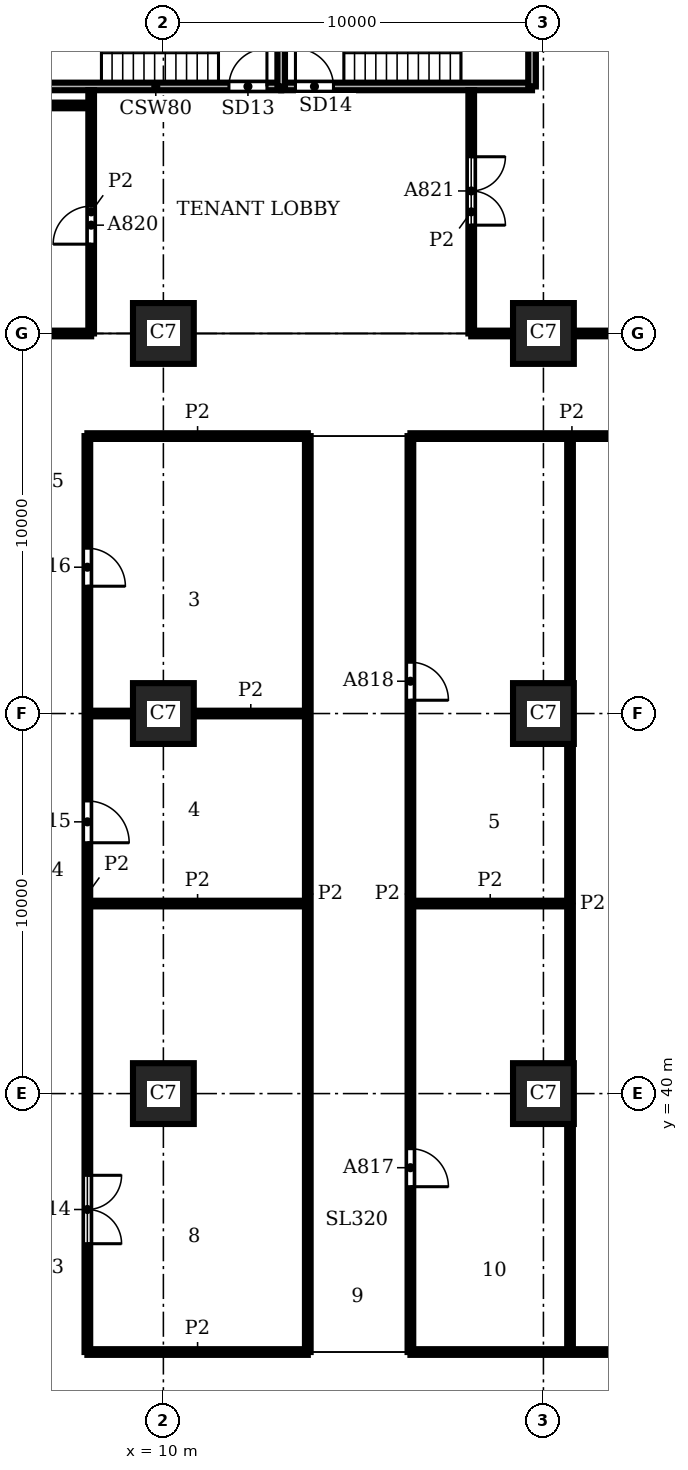
"""IFC4 building model, lengths in metres.
Left out: names, types, materials, properties, quantities, classifications, styles, units other than length and angle.
Written with IfcOpenShell. Run it as: python <this file> out.ifc"""

import sys

from ifc_helpers import new_model, si_unit, direction, frame, frame_2d, origin, origin_2d, place, context, subcontext, project, spatial, rectangle, extrude, element, fill, save


model = new_model("IFC4")
c1 = context("Model", 3, precision=1e-05, world=origin(), true_north=direction((0.0, 1.0)))
c2 = subcontext(c1, "Body", "Model", "MODEL_VIEW")
j1 = project(units=[si_unit("LENGTHUNIT", "METRE"), si_unit("PLANEANGLEUNIT", "RADIAN")], contexts=[c1])
p1 = place(None, origin())
s1 = spatial("IfcSite", under=j1, at=p1, CompositionType="ELEMENT")
p2 = place(p1, origin())
s2 = spatial("IfcBuilding", under=s1, at=p2, CompositionType="ELEMENT")
p3 = place(p2, frame((0.0, 0.0, 93.9)))
s3 = spatial("IfcBuildingStorey", under=s2, at=p3, CompositionType="ELEMENT", Elevation=93.9)
for number, where, z_axis, x_axis in (
    (1, (10.0, 40.0, 0.0), (0.0, 0.0, 1.0), (1.0, 0.0, 0.0)),
    (2, (10.0, 50.0, 0.0), (0.0, 0.0, 1.0), (1.0, 0.0, 0.0)),
    (3, (10.0, 60.0, 0.0), (0.0, 0.0, 1.0), (1.0, 0.0, 0.0)),
    (4, (20.0, 40.0, 0.0), (0.0, 0.0, 1.0), (1.0, 0.0, 0.0)),
    (5, (20.0, 50.0, 0.0), (0.0, 0.0, 1.0), (1.0, 0.0, 0.0)),
    (6, (20.0, 60.0, 0.0), (0.0, 0.0, 1.0), (1.0, 0.0, 0.0)),
):
    element("IfcColumn", number, at=place(p3, frame(where, z_axis=z_axis, x_axis=x_axis)), inside=s3, PredefinedType="COLUMN", context=c2, shape_type="SweptSolid", body=[
        extrude(rectangle(XDim=1.6, YDim=1.6, at=origin_2d()), origin(), (0.0, 0.0, 1.0), 3.9),
    ])
p4 = place(p3, frame((6.5, 66.5, 0.0), z_axis=(0.0, 0.0, 1.0), x_axis=(1.0, 0.0, 0.0)))
e7 = element("IfcWall", 7, at=p4, inside=s3, PredefinedType="SHEAR", context=c2, shape_type="SweptSolid", body=[
    extrude(rectangle(XDim=6.6, YDim=0.2, at=frame_2d((3.3, 0.0))), origin(), (0.0, 0.0, 1.0), 3.58),
])
p5 = place(p4, frame((5.225, 0.0, 0.0)))
e8 = element("IfcOpeningElement", 8, at=p5, cuts=e7, PredefinedType="OPENING", context=c2, shape_type="SweptSolid", body=[
    extrude(rectangle(XDim=1.0, YDim=2.1, at=frame_2d((0.5, 1.05))), frame((0.0, 0.11, 0.0), z_axis=(0.0, -1.0, 0.0), x_axis=(1.0, 0.0, 0.0)), (0.0, 0.0, 1.0), 0.22),
])
p6 = place(p3, frame((13.1, 66.5, 0.0), z_axis=(0.0, 0.0, 1.0), x_axis=(1.0, 0.0, 0.0)))
e9 = element("IfcWall", 9, at=p6, inside=s3, PredefinedType="SHEAR", context=c2, shape_type="SweptSolid", body=[
    extrude(rectangle(XDim=6.6, YDim=0.2, at=frame_2d((3.3, 0.0))), origin(), (0.0, 0.0, 1.0), 3.58),
])
p7 = place(p6, frame((0.375, 0.0, 0.0)))
e10 = element("IfcOpeningElement", 10, at=p7, cuts=e9, PredefinedType="OPENING", context=c2, shape_type="SweptSolid", body=[
    extrude(rectangle(XDim=1.0, YDim=2.1, at=frame_2d((0.5, 1.05))), frame((0.0, 0.11, 0.0), z_axis=(0.0, -1.0, 0.0), x_axis=(1.0, 0.0, 0.0)), (0.0, 0.0, 1.0), 0.22),
])
for number, where, z_axis, x_axis in (
    (11, (13.1, 66.5, 0.0), (0.0, 0.0, 1.0), (0.0, 1.0, 0.0)),
    (12, (19.7, 66.5, 0.0), (0.0, 0.0, 1.0), (0.0, 1.0, 0.0)),
):
    element("IfcWall", number, at=place(p3, frame(where, z_axis=z_axis, x_axis=x_axis)), inside=s3, PredefinedType="SHEAR", context=c2, shape_type="SweptSolid", body=[
        extrude(rectangle(XDim=3.3, YDim=0.2, at=frame_2d((1.65, 0.0))), origin(), (0.0, 0.0, 1.0), 3.58),
    ])
p8 = place(p3, frame((8.0, 33.2, 0.0), z_axis=(0.0, 0.0, 1.0), x_axis=(0.0, 1.0, 0.0)))
e13 = element("IfcWall", 13, at=p8, inside=s3, PredefinedType="PARTITIONING", context=c2, shape_type="SweptSolid", body=[
    extrude(rectangle(XDim=24.1, YDim=0.15, at=frame_2d((12.05, 0.0))), origin(), (0.0, 0.0, 1.0), 3.58),
])
p9 = place(p8, frame((2.85, 0.0, 0.0)))
e14 = element("IfcOpeningElement", 14, at=p9, cuts=e13, PredefinedType="OPENING", context=c2, shape_type="SweptSolid", body=[
    extrude(rectangle(XDim=1.8, YDim=2.1, at=frame_2d((0.9, 1.05))), frame((0.0, 0.085, 0.0), z_axis=(0.0, -1.0, 0.0), x_axis=(1.0, 0.0, 0.0)), (0.0, 0.0, 1.0), 0.17),
])
p10 = place(p8, frame((13.4, 0.0, 0.0)))
e15 = element("IfcOpeningElement", 15, at=p10, cuts=e13, PredefinedType="OPENING", context=c2, shape_type="SweptSolid", body=[
    extrude(rectangle(XDim=1.1, YDim=2.1, at=frame_2d((0.55, 1.05))), frame((0.0, 0.085, 0.0), z_axis=(0.0, -1.0, 0.0), x_axis=(1.0, 0.0, 0.0)), (0.0, 0.0, 1.0), 0.17),
])
p11 = place(p8, frame((20.15, 0.0, 0.0)))
e16 = element("IfcOpeningElement", 16, at=p11, cuts=e13, PredefinedType="OPENING", context=c2, shape_type="SweptSolid", body=[
    extrude(rectangle(XDim=1.0, YDim=2.1, at=frame_2d((0.5, 1.05))), frame((0.0, 0.085, 0.0), z_axis=(0.0, -1.0, 0.0), x_axis=(1.0, 0.0, 0.0)), (0.0, 0.0, 1.0), 0.17),
])
p12 = place(p3, frame((8.1, 60.0, 0.0), z_axis=(0.0, 0.0, 1.0), x_axis=(0.0, 1.0, 0.0)))
e17 = element("IfcWall", 17, at=p12, inside=s3, PredefinedType="PARTITIONING", context=c2, shape_type="SweptSolid", body=[
    extrude(rectangle(XDim=6.4, YDim=0.15, at=frame_2d((3.2, 0.0))), origin(), (0.0, 0.0, 1.0), 3.58),
])
p13 = place(p12, frame((2.35, 0.0, 0.0)))
e18 = element("IfcOpeningElement", 18, at=p13, cuts=e17, PredefinedType="OPENING", context=c2, shape_type="SweptSolid", body=[
    extrude(rectangle(XDim=1.0, YDim=2.1, at=frame_2d((0.5, 1.05))), frame((0.0, 0.085, 0.0), z_axis=(0.0, -1.0, 0.0), x_axis=(1.0, 0.0, 0.0)), (0.0, 0.0, 1.0), 0.17),
])
p14 = place(p3, frame((13.8, 33.2, 0.0), z_axis=(0.0, 0.0, 1.0), x_axis=(0.0, 1.0, 0.0)))
e19 = element("IfcWall", 19, at=p14, inside=s3, PredefinedType="PARTITIONING", context=c2, shape_type="SweptSolid", body=[
    extrude(rectangle(XDim=24.1, YDim=0.15, at=frame_2d((12.05, 0.0))), origin(), (0.0, 0.0, 1.0), 3.58),
])
p15 = place(p3, frame((16.5, 33.2, 0.0), z_axis=(0.0, 0.0, 1.0), x_axis=(0.0, 1.0, 0.0)))
e20 = element("IfcWall", 20, at=p15, inside=s3, PredefinedType="PARTITIONING", context=c2, shape_type="SweptSolid", body=[
    extrude(rectangle(XDim=24.1, YDim=0.15, at=frame_2d((12.05, 0.0))), origin(), (0.0, 0.0, 1.0), 3.58),
])
p16 = place(p15, frame((4.35, 0.0, 0.0)))
e21 = element("IfcOpeningElement", 21, at=p16, cuts=e20, PredefinedType="OPENING", context=c2, shape_type="SweptSolid", body=[
    extrude(rectangle(XDim=1.0, YDim=2.1, at=frame_2d((0.5, 1.05))), frame((0.0, 0.085, 0.0), z_axis=(0.0, -1.0, 0.0), x_axis=(1.0, 0.0, 0.0)), (0.0, 0.0, 1.0), 0.17),
])
p17 = place(p15, frame((17.15, 0.0, 0.0)))
e22 = element("IfcOpeningElement", 22, at=p17, cuts=e20, PredefinedType="OPENING", context=c2, shape_type="SweptSolid", body=[
    extrude(rectangle(XDim=1.0, YDim=2.1, at=frame_2d((0.5, 1.05))), frame((0.0, 0.085, 0.0), z_axis=(0.0, -1.0, 0.0), x_axis=(1.0, 0.0, 0.0)), (0.0, 0.0, 1.0), 0.17),
])
p18 = place(p3, frame((18.1, 60.0, 0.0), z_axis=(0.0, 0.0, 1.0), x_axis=(0.0, 1.0, 0.0)))
e23 = element("IfcWall", 23, at=p18, inside=s3, PredefinedType="PARTITIONING", context=c2, shape_type="SweptSolid", body=[
    extrude(rectangle(XDim=6.4, YDim=0.15, at=frame_2d((3.2, 0.0))), origin(), (0.0, 0.0, 1.0), 3.58),
])
p19 = place(p18, frame((2.85, 0.0, 0.0)))
e24 = element("IfcOpeningElement", 24, at=p19, cuts=e23, PredefinedType="OPENING", context=c2, shape_type="SweptSolid", body=[
    extrude(rectangle(XDim=1.8, YDim=2.1, at=frame_2d((0.9, 1.05))), frame((0.0, 0.085, 0.0), z_axis=(0.0, -1.0, 0.0), x_axis=(1.0, 0.0, 0.0)), (0.0, 0.0, 1.0), 0.17),
])
p20 = place(p3, frame((20.7, 33.2, 0.0), z_axis=(0.0, 0.0, 1.0), x_axis=(0.0, 1.0, 0.0)))
e25 = element("IfcWall", 25, at=p20, inside=s3, PredefinedType="PARTITIONING", context=c2, shape_type="SweptSolid", body=[
    extrude(rectangle(XDim=6.0, YDim=0.15, at=frame_2d((3.0, 0.0))), origin(), (0.0, 0.0, 1.0), 3.58),
])
p21 = place(p3, frame((20.7, 40.8, 0.0), z_axis=(0.0, 0.0, 1.0), x_axis=(0.0, 1.0, 0.0)))
e26 = element("IfcWall", 26, at=p21, inside=s3, PredefinedType="PARTITIONING", context=c2, shape_type="SweptSolid", body=[
    extrude(rectangle(XDim=8.4, YDim=0.15, at=frame_2d((4.2, 0.0))), origin(), (0.0, 0.0, 1.0), 3.58),
])
p22 = place(p3, frame((20.7, 50.8, 0.0), z_axis=(0.0, 0.0, 1.0), x_axis=(0.0, 1.0, 0.0)))
e27 = element("IfcWall", 27, at=p22, inside=s3, PredefinedType="PARTITIONING", context=c2, shape_type="SweptSolid", body=[
    extrude(rectangle(XDim=6.5, YDim=0.15, at=frame_2d((3.25, 0.0))), origin(), (0.0, 0.0, 1.0), 3.58),
])
p23 = place(p3, frame((8.0, 33.2, 0.0), z_axis=(0.0, 0.0, 1.0), x_axis=(1.0, 0.0, 0.0)))
e28 = element("IfcWall", 28, at=p23, inside=s3, PredefinedType="PARTITIONING", context=c2, shape_type="SweptSolid", body=[
    extrude(rectangle(XDim=5.8, YDim=0.15, at=frame_2d((2.9, 0.0))), origin(), (0.0, 0.0, 1.0), 3.58),
])
p24 = place(p3, frame((16.5, 33.2, 0.0), z_axis=(0.0, 0.0, 1.0), x_axis=(1.0, 0.0, 0.0)))
e29 = element("IfcWall", 29, at=p24, inside=s3, PredefinedType="PARTITIONING", context=c2, shape_type="SweptSolid", body=[
    extrude(rectangle(XDim=15.862, YDim=0.15, at=frame_2d((7.931, 0.0))), origin(), (0.0, 0.0, 1.0), 3.58),
])
p25 = place(p24, frame((7.3, 0.0, 0.0)))
e30 = element("IfcOpeningElement", 30, at=p25, cuts=e29, PredefinedType="OPENING", context=c2, shape_type="SweptSolid", body=[
    extrude(rectangle(XDim=1.8, YDim=2.1, at=frame_2d((0.9, 1.05))), frame((0.0, 0.085, 0.0), z_axis=(0.0, -1.0, 0.0), x_axis=(1.0, 0.0, 0.0)), (0.0, 0.0, 1.0), 0.17),
])
p26 = place(p24, frame((14.45, 0.0, 0.0)))
e31 = element("IfcOpeningElement", 31, at=p26, cuts=e29, PredefinedType="OPENING", context=c2, shape_type="SweptSolid", body=[
    extrude(rectangle(XDim=1.0, YDim=2.1, at=frame_2d((0.5, 1.05))), frame((0.0, 0.085, 0.0), z_axis=(0.0, -1.0, 0.0), x_axis=(1.0, 0.0, 0.0)), (0.0, 0.0, 1.0), 0.17),
])
p27 = place(p3, frame((8.0, 45.0, 0.0), z_axis=(0.0, 0.0, 1.0), x_axis=(1.0, 0.0, 0.0)))
e32 = element("IfcWall", 32, at=p27, inside=s3, PredefinedType="PARTITIONING", context=c2, shape_type="SweptSolid", body=[
    extrude(rectangle(XDim=5.8, YDim=0.15, at=frame_2d((2.9, 0.0))), origin(), (0.0, 0.0, 1.0), 3.58),
])
p28 = place(p3, frame((16.5, 45.0, 0.0), z_axis=(0.0, 0.0, 1.0), x_axis=(1.0, 0.0, 0.0)))
e33 = element("IfcWall", 33, at=p28, inside=s3, PredefinedType="PARTITIONING", context=c2, shape_type="SweptSolid", body=[
    extrude(rectangle(XDim=4.2, YDim=0.15, at=frame_2d((2.1, 0.0))), origin(), (0.0, 0.0, 1.0), 3.58),
])
p29 = place(p3, frame((8.0, 50.0, 0.0), z_axis=(0.0, 0.0, 1.0), x_axis=(1.0, 0.0, 0.0)))
e34 = element("IfcWall", 34, at=p29, inside=s3, PredefinedType="PARTITIONING", context=c2, shape_type="SweptSolid", body=[
    extrude(rectangle(XDim=1.2, YDim=0.15, at=frame_2d((0.6, 0.0))), origin(), (0.0, 0.0, 1.0), 3.58),
])
p30 = place(p3, frame((10.8, 50.0, 0.0), z_axis=(0.0, 0.0, 1.0), x_axis=(1.0, 0.0, 0.0)))
e35 = element("IfcWall", 35, at=p30, inside=s3, PredefinedType="PARTITIONING", context=c2, shape_type="SweptSolid", body=[
    extrude(rectangle(XDim=3.0, YDim=0.15, at=frame_2d((1.5, 0.0))), origin(), (0.0, 0.0, 1.0), 3.58),
])
p31 = place(p3, frame((8.0, 57.3, 0.0), z_axis=(0.0, 0.0, 1.0), x_axis=(1.0, 0.0, 0.0)))
e36 = element("IfcWall", 36, at=p31, inside=s3, PredefinedType="PARTITIONING", context=c2, shape_type="SweptSolid", body=[
    extrude(rectangle(XDim=5.8, YDim=0.15, at=frame_2d((2.9, 0.0))), origin(), (0.0, 0.0, 1.0), 3.58),
])
p32 = place(p3, frame((16.5, 57.3, 0.0), z_axis=(0.0, 0.0, 1.0), x_axis=(1.0, 0.0, 0.0)))
e37 = element("IfcWall", 37, at=p32, inside=s3, PredefinedType="PARTITIONING", context=c2, shape_type="SweptSolid", body=[
    extrude(rectangle(XDim=8.5, YDim=0.15, at=frame_2d((4.25, 0.0))), origin(), (0.0, 0.0, 1.0), 3.58),
])
p33 = place(p3, frame((0.6, 60.0, 0.0), z_axis=(0.0, 0.0, 1.0), x_axis=(1.0, 0.0, 0.0)))
e38 = element("IfcWall", 38, at=p33, inside=s3, PredefinedType="PARTITIONING", context=c2, shape_type="SweptSolid", body=[
    extrude(rectangle(XDim=7.5, YDim=0.15, at=frame_2d((3.75, 0.0))), origin(), (0.0, 0.0, 1.0), 3.58),
])
p34 = place(p3, frame((18.1, 60.0, 0.0), z_axis=(0.0, 0.0, 1.0), x_axis=(1.0, 0.0, 0.0)))
e39 = element("IfcWall", 39, at=p34, inside=s3, PredefinedType="PARTITIONING", context=c2, shape_type="SweptSolid", body=[
    extrude(rectangle(XDim=1.1, YDim=0.15, at=frame_2d((0.55, 0.0))), origin(), (0.0, 0.0, 1.0), 3.58),
])
p35 = place(p3, frame((20.8, 60.0, 0.0), z_axis=(0.0, 0.0, 1.0), x_axis=(1.0, 0.0, 0.0)))
e40 = element("IfcWall", 40, at=p35, inside=s3, PredefinedType="PARTITIONING", context=c2, shape_type="SweptSolid", body=[
    extrude(rectangle(XDim=8.6, YDim=0.15, at=frame_2d((4.3, 0.0))), origin(), (0.0, 0.0, 1.0), 3.58),
])
p36 = place(p3, frame((0.644, 66.0, 0.0), z_axis=(0.0, 0.0, 1.0), x_axis=(1.0, 0.0, 0.0)))
e41 = element("IfcWall", 41, at=p36, inside=s3, PredefinedType="PARTITIONING", context=c2, shape_type="SweptSolid", body=[
    extrude(rectangle(XDim=7.456, YDim=0.15, at=frame_2d((3.728, 0.0))), origin(), (0.0, 0.0, 1.0), 3.58),
])
p37 = place(p5, origin())
e42 = element("IfcDoor", 42, at=p37, inside=s3, OperationType="SINGLE_SWING_RIGHT", PredefinedType="DOOR", context=c2, shape_type="SweptSolid", body=[
    extrude(rectangle(XDim=1.0, YDim=2.1, at=frame_2d((0.5, 1.05))), frame((0.0, 0.025, 0.0), z_axis=(0.0, -1.0, 0.0), x_axis=(1.0, 0.0, 0.0)), (0.0, 0.0, 1.0), 0.05),
])
fill(e8, e42)
p38 = place(p7, origin())
e43 = element("IfcDoor", 43, at=p38, inside=s3, OperationType="SINGLE_SWING_LEFT", PredefinedType="DOOR", context=c2, shape_type="SweptSolid", body=[
    extrude(rectangle(XDim=1.0, YDim=2.1, at=frame_2d((0.5, 1.05))), frame((0.0, 0.025, 0.0), z_axis=(0.0, -1.0, 0.0), x_axis=(1.0, 0.0, 0.0)), (0.0, 0.0, 1.0), 0.05),
])
fill(e10, e43)
p39 = place(p9, frame((1.8, 0.0, 0.0), z_axis=(0.0, 0.0, 1.0), x_axis=(-1.0, 0.0, 0.0)))
e44 = element("IfcDoor", 44, at=p39, inside=s3, OperationType="DOUBLE_DOOR_SINGLE_SWING", PredefinedType="DOOR", context=c2, shape_type="SweptSolid", body=[
    extrude(rectangle(XDim=1.8, YDim=2.1, at=frame_2d((0.9, 1.05))), frame((0.0, 0.025, 0.0), z_axis=(0.0, -1.0, 0.0), x_axis=(1.0, 0.0, 0.0)), (0.0, 0.0, 1.0), 0.05),
])
fill(e14, e44)
p40 = place(p10, frame((1.1, 0.0, 0.0), z_axis=(0.0, 0.0, 1.0), x_axis=(-1.0, 0.0, 0.0)))
e45 = element("IfcDoor", 45, at=p40, inside=s3, OperationType="SINGLE_SWING_RIGHT", PredefinedType="DOOR", context=c2, shape_type="SweptSolid", body=[
    extrude(rectangle(XDim=1.1, YDim=2.1, at=frame_2d((0.55, 1.05))), frame((0.0, 0.025, 0.0), z_axis=(0.0, -1.0, 0.0), x_axis=(1.0, 0.0, 0.0)), (0.0, 0.0, 1.0), 0.05),
])
fill(e15, e45)
p41 = place(p11, frame((1.0, 0.0, 0.0), z_axis=(0.0, 0.0, 1.0), x_axis=(-1.0, 0.0, 0.0)))
e46 = element("IfcDoor", 46, at=p41, inside=s3, OperationType="SINGLE_SWING_RIGHT", PredefinedType="DOOR", context=c2, shape_type="SweptSolid", body=[
    extrude(rectangle(XDim=1.0, YDim=2.1, at=frame_2d((0.5, 1.05))), frame((0.0, 0.025, 0.0), z_axis=(0.0, -1.0, 0.0), x_axis=(1.0, 0.0, 0.0)), (0.0, 0.0, 1.0), 0.05),
])
fill(e16, e46)
p42 = place(p16, frame((1.0, 0.0, 0.0), z_axis=(0.0, 0.0, 1.0), x_axis=(-1.0, 0.0, 0.0)))
e47 = element("IfcDoor", 47, at=p42, inside=s3, OperationType="SINGLE_SWING_RIGHT", PredefinedType="DOOR", context=c2, shape_type="SweptSolid", body=[
    extrude(rectangle(XDim=1.0, YDim=2.1, at=frame_2d((0.5, 1.05))), frame((0.0, 0.025, 0.0), z_axis=(0.0, -1.0, 0.0), x_axis=(1.0, 0.0, 0.0)), (0.0, 0.0, 1.0), 0.05),
])
fill(e21, e47)
p43 = place(p17, frame((1.0, 0.0, 0.0), z_axis=(0.0, 0.0, 1.0), x_axis=(-1.0, 0.0, 0.0)))
e48 = element("IfcDoor", 48, at=p43, inside=s3, OperationType="SINGLE_SWING_RIGHT", PredefinedType="DOOR", context=c2, shape_type="SweptSolid", body=[
    extrude(rectangle(XDim=1.0, YDim=2.1, at=frame_2d((0.5, 1.05))), frame((0.0, 0.025, 0.0), z_axis=(0.0, -1.0, 0.0), x_axis=(1.0, 0.0, 0.0)), (0.0, 0.0, 1.0), 0.05),
])
fill(e22, e48)
p44 = place(p13, origin())
e49 = element("IfcDoor", 49, at=p44, inside=s3, OperationType="SINGLE_SWING_LEFT", PredefinedType="DOOR", context=c2, shape_type="SweptSolid", body=[
    extrude(rectangle(XDim=1.0, YDim=2.1, at=frame_2d((0.5, 1.05))), frame((0.0, 0.025, 0.0), z_axis=(0.0, -1.0, 0.0), x_axis=(1.0, 0.0, 0.0)), (0.0, 0.0, 1.0), 0.05),
])
fill(e18, e49)
p45 = place(p19, frame((1.8, 0.0, 0.0), z_axis=(0.0, 0.0, 1.0), x_axis=(-1.0, 0.0, 0.0)))
e50 = element("IfcDoor", 50, at=p45, inside=s3, OperationType="DOUBLE_DOOR_SINGLE_SWING", PredefinedType="DOOR", context=c2, shape_type="SweptSolid", body=[
    extrude(rectangle(XDim=1.8, YDim=2.1, at=frame_2d((0.9, 1.05))), frame((0.0, 0.025, 0.0), z_axis=(0.0, -1.0, 0.0), x_axis=(1.0, 0.0, 0.0)), (0.0, 0.0, 1.0), 0.05),
])
fill(e24, e50)
save(model, sys.argv[1])
